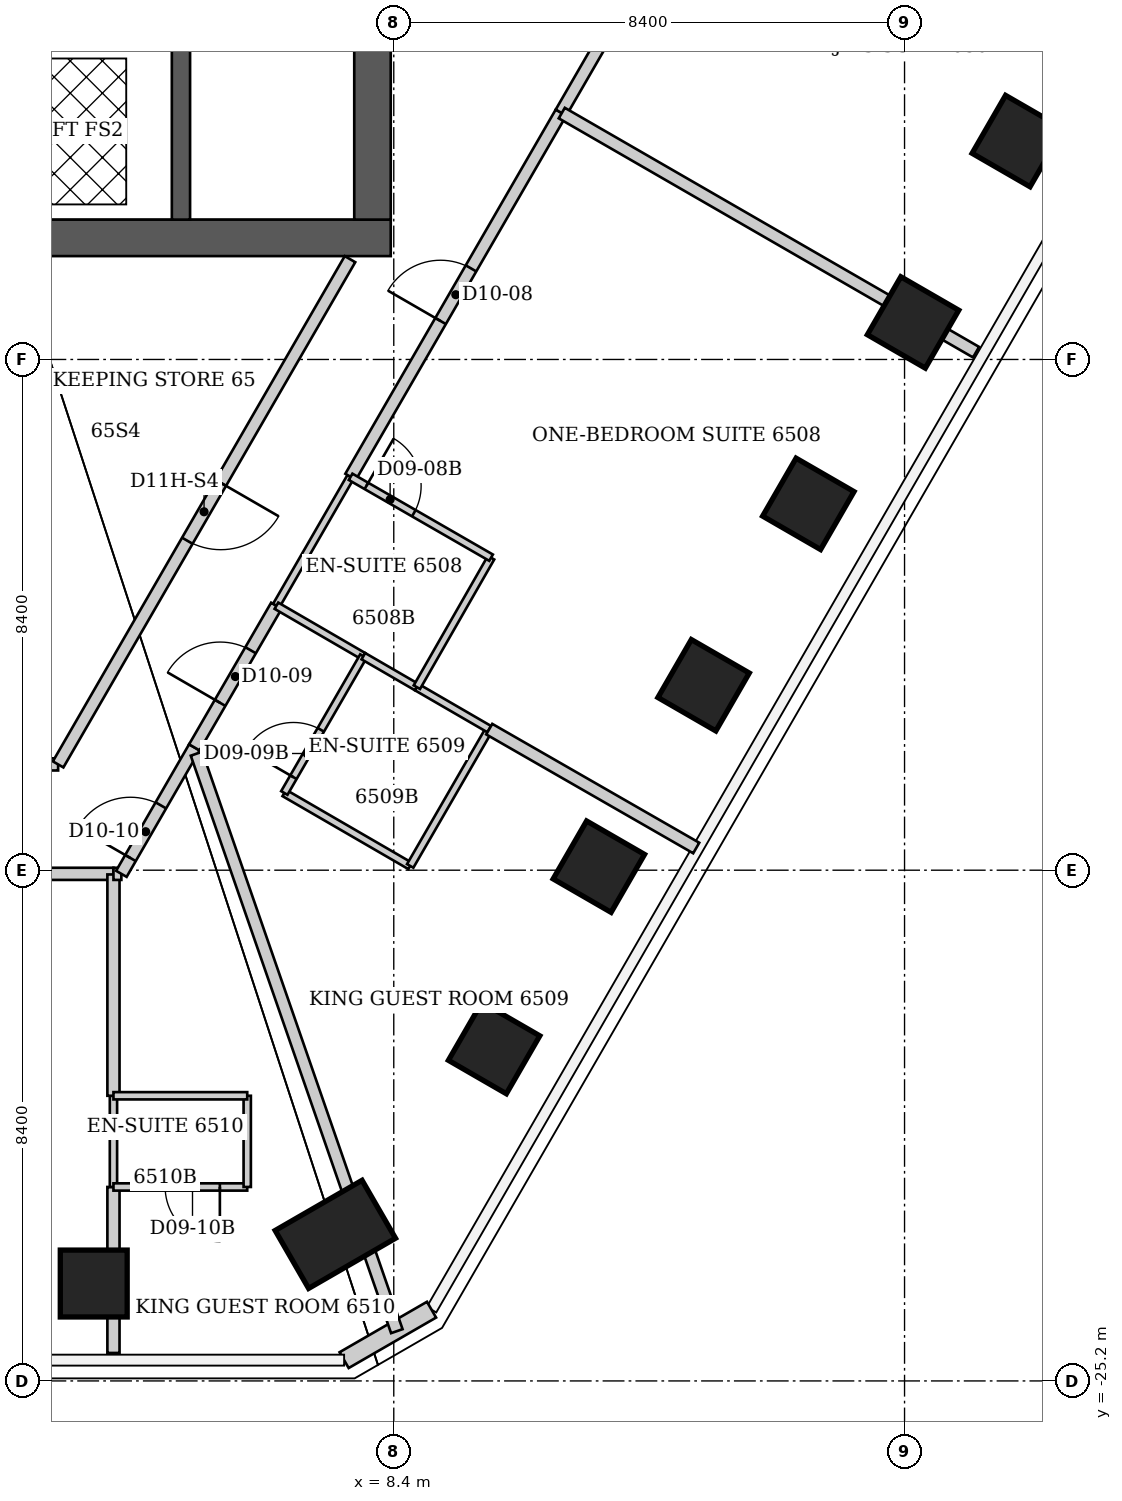
"""IFC4 building model, lengths in metres.
Left out: names, types, materials, properties, quantities, classifications, styles, units other than length and angle.
Written with IfcOpenShell. Run it as: python <this file> out.ifc"""

import sys

from ifc_helpers import new_model, si_unit, direction, frame, frame_2d, origin, origin_2d, place, context, subcontext, project, spatial, rectangle, extrude, element, fill, save


model = new_model("IFC4")
c1 = context("Model", 3, precision=1e-05, world=origin(), true_north=direction((0.0, 1.0)))
c2 = subcontext(c1, "Body", "Model", "MODEL_VIEW")
j1 = project(units=[si_unit("LENGTHUNIT", "METRE"), si_unit("PLANEANGLEUNIT", "RADIAN")], contexts=[c1])
p1 = place(None, origin())
s1 = spatial("IfcSite", under=j1, at=p1, CompositionType="ELEMENT")
p2 = place(p1, origin())
s2 = spatial("IfcBuilding", under=s1, at=p2, CompositionType="ELEMENT")
p3 = place(p2, frame((0.0, 0.0, 260.8)))
s3 = spatial("IfcBuildingStorey", under=s2, at=p3, CompositionType="ELEMENT", Elevation=260.8)
for number, where, z_axis, x_axis in (
    (1, (18.663, -4.808, 0.0), (0.0, 0.0, 1.0), (0.866, -0.5, 0.0)),
    (2, (16.94, -7.792, 0.0), (0.0, 0.0, 1.0), (0.866, -0.5, 0.0)),
    (3, (15.218, -10.775, 0.0), (0.0, 0.0, 1.0), (0.866, -0.5, 0.0)),
    (4, (13.495, -13.759, 0.0), (0.0, 0.0, 1.0), (0.866, -0.5, 0.0)),
    (5, (11.773, -16.742, 0.0), (0.0, 0.0, 1.0), (0.866, -0.5, 0.0)),
    (6, (10.05, -19.725, 0.0), (0.0, 0.0, 1.0), (0.866, -0.5, 0.0)),
):
    element("IfcColumn", number, at=place(p3, frame(where, z_axis=z_axis, x_axis=x_axis)), inside=s3, PredefinedType="COLUMN", context=c2, shape_type="SweptSolid", body=[
        extrude(rectangle(XDim=1.1, YDim=1.1, at=origin_2d()), origin(), (0.0, 0.0, 1.0), 3.8),
    ])
p4 = place(p3, frame((7.439, -22.79, 0.0), z_axis=(0.0, 0.0, 1.0), x_axis=(0.5, -0.866025403784, 0.0)))
e7 = element("IfcColumn", 7, at=p4, inside=s3, PredefinedType="COLUMN", context=c2, shape_type="SweptSolid", body=[
    extrude(rectangle(XDim=1.1, YDim=1.65, at=origin_2d()), origin(), (0.0, 0.0, 1.0), 3.8),
])
p5 = place(p3, frame((3.466, -23.598, 0.0), z_axis=(0.0, 0.0, 1.0), x_axis=(0.0, -1.0, 0.0)))
e8 = element("IfcColumn", 8, at=p5, inside=s3, PredefinedType="COLUMN", context=c2, shape_type="SweptSolid", body=[
    extrude(rectangle(XDim=1.1, YDim=1.1, at=origin_2d()), origin(), (0.0, 0.0, 1.0), 3.8),
])
p6 = place(p3, frame((-8.35, -6.4, 0.0), z_axis=(0.0, 0.0, 1.0), x_axis=(1.0, 0.0, 0.0)))
e9 = element("IfcWall", 9, at=p6, inside=s3, PredefinedType="SHEAR", context=c2, shape_type="SweptSolid", body=[
    extrude(rectangle(XDim=16.7, YDim=0.6, at=frame_2d((8.35, 0.0))), origin(), (0.0, 0.0, 1.0), 3.8),
])
p7 = place(p3, frame((8.05, -6.1, 0.0), z_axis=(0.0, 0.0, 1.0), x_axis=(0.0, 1.0, 0.0)))
e10 = element("IfcWall", 10, at=p7, inside=s3, PredefinedType="SHEAR", context=c2, shape_type="SweptSolid", body=[
    extrude(rectangle(XDim=12.2, YDim=0.6, at=frame_2d((6.1, 0.0))), origin(), (0.0, 0.0, 1.0), 3.8),
])
p8 = place(p7, frame((7.6, 0.0, 0.0)))
e11 = element("IfcOpeningElement", 11, at=p8, cuts=e10, PredefinedType="OPENING", context=c2, shape_type="SweptSolid", body=[
    extrude(rectangle(XDim=1.2, YDim=2.2, at=frame_2d((0.6, 1.1))), frame((0.0, 0.3, 0.0), z_axis=(0.0, -1.0, 0.0), x_axis=(1.0, 0.0, 0.0)), (0.0, 0.0, 1.0), 0.6),
])
p9 = place(p3, frame((4.9, -6.1, 0.0), z_axis=(0.0, 0.0, 1.0), x_axis=(0.0, 1.0, 0.0)))
e12 = element("IfcWall", 12, at=p9, inside=s3, PredefinedType="SHEAR", context=c2, shape_type="SweptSolid", body=[
    extrude(rectangle(XDim=7.2, YDim=0.3, at=frame_2d((3.6, 0.0))), origin(), (0.0, 0.0, 1.0), 3.8),
])
p10 = place(p3, frame((9.021, -24.028, 0.0), z_axis=(0.0, 0.0, 1.0), x_axis=(-0.865989634427, -0.500061949227, 0.0)))
e13 = element("IfcWall", 13, at=p10, inside=s3, PredefinedType="SOLIDWALL", context=c2, shape_type="SweptSolid", body=[
    extrude(rectangle(XDim=1.66, YDim=0.3, at=frame_2d((0.83, 0.0))), origin(), (0.0, 0.0, 1.0), 3.64),
])
p11 = place(p3, frame((-1.34, -16.86, 0.0), z_axis=(0.0, 0.0, 1.0), x_axis=(1.0, 0.0, 0.0)))
e14 = element("IfcWall", 14, at=p11, inside=s3, PredefinedType="PARTITIONING", context=c2, shape_type="SweptSolid", body=[
    extrude(rectangle(XDim=5.13, YDim=0.2, at=frame_2d((2.565, 0.0))), origin(), (0.0, 0.0, 1.0), 3.64),
])
p12 = place(p11, frame((2.065, 0.0, 0.0)))
e15 = element("IfcOpeningElement", 15, at=p12, cuts=e14, PredefinedType="OPENING", context=c2, shape_type="SweptSolid", body=[
    extrude(rectangle(XDim=1.0, YDim=2.13, at=frame_2d((0.5, 1.065))), frame((0.0, 0.1, 0.0), z_axis=(0.0, -1.0, 0.0), x_axis=(1.0, 0.0, 0.0)), (0.0, 0.0, 1.0), 0.2),
])
p13 = place(p3, frame((2.88, -15.06, 0.0), z_axis=(0.0, 0.0, 1.0), x_axis=(-1.0, 0.0, 0.0)))
e16 = element("IfcWall", 16, at=p13, inside=s3, PredefinedType="PARTITIONING", context=c2, shape_type="SweptSolid", body=[
    extrude(rectangle(XDim=1.28, YDim=0.2, at=frame_2d((0.64, 0.0))), origin(), (0.0, 0.0, 1.0), 3.64),
])
p14 = place(p3, frame((3.79, -24.74, 0.0), z_axis=(0.0, 0.0, 1.0), x_axis=(0.0, 1.0, 0.0)))
e17 = element("IfcWall", 17, at=p14, inside=s3, PredefinedType="PARTITIONING", context=c2, shape_type="SweptSolid", body=[
    extrude(rectangle(XDim=2.73, YDim=0.2, at=frame_2d((1.365, 0.0))), origin(), (0.0, 0.0, 1.0), 3.64),
])
p15 = place(p3, frame((3.79, -22.01, 0.0), z_axis=(0.0, 0.0, 1.0), x_axis=(0.0, 1.0, 0.0)))
e18 = element("IfcWall", 18, at=p15, inside=s3, PredefinedType="PARTITIONING", context=c2, shape_type="SweptSolid", body=[
    extrude(rectangle(XDim=1.5, YDim=0.12, at=frame_2d((0.75, 0.0))), origin(), (0.0, 0.0, 1.0), 3.64),
])
p16 = place(p3, frame((3.79, -22.01, 0.0), z_axis=(0.0, 0.0, 1.0), x_axis=(1.0, 0.0, 0.0)))
e19 = element("IfcWall", 19, at=p16, inside=s3, PredefinedType="PARTITIONING", context=c2, shape_type="SweptSolid", body=[
    extrude(rectangle(XDim=2.2, YDim=0.12, at=frame_2d((1.1, 0.0))), origin(), (0.0, 0.0, 1.0), 3.64),
])
p17 = place(p16, frame((0.85, 0.0, 0.0)))
e20 = element("IfcOpeningElement", 20, at=p17, cuts=e19, PredefinedType="OPENING", context=c2, shape_type="SweptSolid", body=[
    extrude(rectangle(XDim=0.9, YDim=2.03, at=frame_2d((0.45, 1.015))), frame((0.0, 0.06, 0.0), z_axis=(0.0, -1.0, 0.0), x_axis=(1.0, 0.0, 0.0)), (0.0, 0.0, 1.0), 0.12),
])
p18 = place(p3, frame((3.79, -20.51, 0.0), z_axis=(0.0, 0.0, 1.0), x_axis=(0.0, 1.0, 0.0)))
e21 = element("IfcWall", 21, at=p18, inside=s3, PredefinedType="PARTITIONING", context=c2, shape_type="SweptSolid", body=[
    extrude(rectangle(XDim=3.64, YDim=0.2, at=frame_2d((1.82, 0.0))), origin(), (0.0, 0.0, 1.0), 3.64),
])
p19 = place(p3, frame((3.79, -16.86, 0.0), z_axis=(0.0, 0.0, 1.0), x_axis=(1.0, 0.0, 0.0)))
e22 = element("IfcWall", 22, at=p19, inside=s3, PredefinedType="PARTITIONING", context=c2, shape_type="SweptSolid", body=[
    extrude(rectangle(XDim=0.13, YDim=0.2, at=frame_2d((0.065, 0.0))), origin(), (0.0, 0.0, 1.0), 3.64),
])
p20 = place(p3, frame((3.92, -16.86, 0.0), z_axis=(0.0, 0.0, 1.0), x_axis=(0.499693115345, 0.866202511239, 0.0)))
e23 = element("IfcWall", 23, at=p20, inside=s3, PredefinedType="PARTITIONING", context=c2, shape_type="SweptSolid", body=[
    extrude(rectangle(XDim=2.401, YDim=0.2, at=frame_2d((1.201, 0.0))), origin(), (0.0, 0.0, 1.0), 3.64),
])
p21 = place(p20, frame((0.3, 0.0, 0.0)))
e24 = element("IfcOpeningElement", 24, at=p21, cuts=e23, PredefinedType="OPENING", context=c2, shape_type="SweptSolid", body=[
    extrude(rectangle(XDim=1.0, YDim=2.13, at=frame_2d((0.5, 1.065))), frame((0.0, 0.1, 0.0), z_axis=(0.0, -1.0, 0.0), x_axis=(1.0, 0.0, 0.0)), (0.0, 0.0, 1.0), 0.2),
])
p22 = place(p3, frame((5.12, -14.78, 0.0), z_axis=(0.0, 0.0, 1.0), x_axis=(0.501343576294, 0.865248298761, 0.0)))
e25 = element("IfcWall", 25, at=p22, inside=s3, PredefinedType="PARTITIONING", context=c2, shape_type="SweptSolid", body=[
    extrude(rectangle(XDim=2.693, YDim=0.2, at=frame_2d((1.346, 0.0))), origin(), (0.0, 0.0, 1.0), 3.64),
])
p23 = place(p22, frame((0.846, 0.0, 0.0)))
e26 = element("IfcOpeningElement", 26, at=p23, cuts=e25, PredefinedType="OPENING", context=c2, shape_type="SweptSolid", body=[
    extrude(rectangle(XDim=1.0, YDim=2.13, at=frame_2d((0.5, 1.065))), frame((0.0, 0.1, 0.0), z_axis=(0.0, -1.0, 0.0), x_axis=(1.0, 0.0, 0.0)), (0.0, 0.0, 1.0), 0.2),
])
p24 = place(p3, frame((5.99, -22.01, 0.0), z_axis=(0.0, 0.0, 1.0), x_axis=(0.0, 1.0, 0.0)))
e27 = element("IfcWall", 27, at=p24, inside=s3, PredefinedType="PARTITIONING", context=c2, shape_type="SweptSolid", body=[
    extrude(rectangle(XDim=1.5, YDim=0.12, at=frame_2d((0.75, 0.0))), origin(), (0.0, 0.0, 1.0), 3.64),
])
p25 = place(p3, frame((5.99, -20.51, 0.0), z_axis=(0.0, 0.0, 1.0), x_axis=(-1.0, 0.0, 0.0)))
e28 = element("IfcWall", 28, at=p25, inside=s3, PredefinedType="PARTITIONING", context=c2, shape_type="SweptSolid", body=[
    extrude(rectangle(XDim=2.2, YDim=0.12, at=frame_2d((1.1, 0.0))), origin(), (0.0, 0.0, 1.0), 3.64),
])
p26 = place(p3, frame((6.467, -12.448, 0.0), z_axis=(0.0, 0.0, 1.0), x_axis=(0.499875104448, 0.866097500258, 0.0)))
e29 = element("IfcWall", 29, at=p26, inside=s3, PredefinedType="PARTITIONING", context=c2, shape_type="SweptSolid", body=[
    extrude(rectangle(XDim=2.446, YDim=0.12, at=frame_2d((1.223, 0.0))), origin(), (0.0, 0.0, 1.0), 3.64),
])
p27 = place(p3, frame((6.47, -12.45, 0.0), z_axis=(0.0, 0.0, 1.0), x_axis=(0.864842719649, -0.502042896843, 0.0)))
e30 = element("IfcWall", 30, at=p27, inside=s3, PredefinedType="PARTITIONING", context=c2, shape_type="SweptSolid", body=[
    extrude(rectangle(XDim=1.653, YDim=0.12, at=frame_2d((0.827, 0.0))), origin(), (0.0, 0.0, 1.0), 3.64),
])
p28 = place(p3, frame((6.6, -15.53, 0.0), z_axis=(0.0, 0.0, 1.0), x_axis=(0.865130376012, -0.501547039172, 0.0)))
e31 = element("IfcWall", 31, at=p28, inside=s3, PredefinedType="PARTITIONING", context=c2, shape_type="SweptSolid", body=[
    extrude(rectangle(XDim=2.393, YDim=0.12, at=frame_2d((1.196, 0.0))), origin(), (0.0, 0.0, 1.0), 3.64),
])
p29 = place(p3, frame((7.68, -6.75, 0.0), z_axis=(0.0, 0.0, 1.0), x_axis=(-0.500174600737, -0.865924574532, 0.0)))
e32 = element("IfcWall", 32, at=p29, inside=s3, PredefinedType="PARTITIONING", context=c2, shape_type="SweptSolid", body=[
    extrude(rectangle(XDim=9.597, YDim=0.2, at=frame_2d((4.798, 0.0))), origin(), (0.0, 0.0, 1.0), 3.64),
])
p30 = place(p29, frame((4.248, 0.0, 0.0)))
e33 = element("IfcOpeningElement", 33, at=p30, cuts=e32, PredefinedType="OPENING", context=c2, shape_type="SweptSolid", body=[
    extrude(rectangle(XDim=1.1, YDim=2.2, at=frame_2d((0.55, 1.1))), frame((0.0, 0.1, 0.0), z_axis=(0.0, -1.0, 0.0), x_axis=(1.0, 0.0, 0.0)), (0.0, 0.0, 1.0), 0.2),
])
p31 = place(p3, frame((7.69, -10.33, 0.0), z_axis=(0.0, 0.0, 1.0), x_axis=(0.500177633683, 0.865922822637, 0.0)))
e34 = element("IfcWall", 34, at=p31, inside=s3, PredefinedType="PARTITIONING", context=c2, shape_type="SweptSolid", body=[
    extrude(rectangle(XDim=6.917, YDim=0.2, at=frame_2d((3.459, 0.0))), origin(), (0.0, 0.0, 1.0), 3.64),
])
p32 = place(p31, frame((2.959, 0.0, 0.0)))
e35 = element("IfcOpeningElement", 35, at=p32, cuts=e34, PredefinedType="OPENING", context=c2, shape_type="SweptSolid", body=[
    extrude(rectangle(XDim=1.0, YDim=2.13, at=frame_2d((0.5, 1.065))), frame((0.0, 0.1, 0.0), z_axis=(0.0, -1.0, 0.0), x_axis=(1.0, 0.0, 0.0)), (0.0, 0.0, 1.0), 0.2),
])
p33 = place(p3, frame((7.9, -13.28, 0.0), z_axis=(0.0, 0.0, 1.0), x_axis=(-0.500221244143, -0.865897630733, 0.0)))
e36 = element("IfcWall", 36, at=p33, inside=s3, PredefinedType="PARTITIONING", context=c2, shape_type="SweptSolid", body=[
    extrude(rectangle(XDim=2.598, YDim=0.12, at=frame_2d((1.299, 0.0))), origin(), (0.0, 0.0, 1.0), 3.64),
])
p34 = place(p33, frame((1.399, 0.0, 0.0)))
e37 = element("IfcOpeningElement", 37, at=p34, cuts=e36, PredefinedType="OPENING", context=c2, shape_type="SweptSolid", body=[
    extrude(rectangle(XDim=0.9, YDim=2.03, at=frame_2d((0.45, 1.015))), frame((0.0, 0.06, 0.0), z_axis=(0.0, -1.0, 0.0), x_axis=(1.0, 0.0, 0.0)), (0.0, 0.0, 1.0), 0.12),
])
p35 = place(p3, frame((7.9, -13.28, 0.0), z_axis=(0.0, 0.0, 1.0), x_axis=(0.86522903342, -0.501376824082, 0.0)))
e38 = element("IfcWall", 38, at=p35, inside=s3, PredefinedType="PARTITIONING", context=c2, shape_type="SweptSolid", body=[
    extrude(rectangle(XDim=1.017, YDim=0.12, at=frame_2d((0.509, 0.0))), origin(), (0.0, 0.0, 1.0), 3.64),
])
p36 = place(p3, frame((8.45, -24.382, 0.0), z_axis=(0.0, 0.0, 1.0), x_axis=(-0.327686879249, 0.944786382823, 0.0)))
e39 = element("IfcWall", 39, at=p36, inside=s3, PredefinedType="PARTITIONING", context=c2, shape_type="SweptSolid", body=[
    extrude(rectangle(XDim=10.053, YDim=0.2, at=frame_2d((5.026, 0.0))), origin(), (0.0, 0.0, 1.0), 3.64),
])
p37 = place(p3, frame((8.67, -16.73, 0.0), z_axis=(0.0, 0.0, 1.0), x_axis=(0.500291685314, 0.865856933682, 0.0)))
e40 = element("IfcWall", 40, at=p37, inside=s3, PredefinedType="PARTITIONING", context=c2, shape_type="SweptSolid", body=[
    extrude(rectangle(XDim=2.599, YDim=0.12, at=frame_2d((1.299, 0.0))), origin(), (0.0, 0.0, 1.0), 3.64),
])
p38 = place(p3, frame((8.78, -13.79, 0.0), z_axis=(0.0, 0.0, 1.0), x_axis=(0.865102050426, -0.501595895466, 0.0)))
e41 = element("IfcWall", 41, at=p38, inside=s3, PredefinedType="PARTITIONING", context=c2, shape_type="SweptSolid", body=[
    extrude(rectangle(XDim=1.375, YDim=0.12, at=frame_2d((0.688, 0.0))), origin(), (0.0, 0.0, 1.0), 3.64),
])
p39 = place(p3, frame((8.78, -13.79, 0.0), z_axis=(0.0, 0.0, 1.0), x_axis=(0.497027744361, 0.86773464915, 0.0)))
e42 = element("IfcWall", 42, at=p39, inside=s3, PredefinedType="PARTITIONING", context=c2, shape_type="SweptSolid", body=[
    extrude(rectangle(XDim=2.455, YDim=0.12, at=frame_2d((1.227, 0.0))), origin(), (0.0, 0.0, 1.0), 3.64),
])
p40 = place(p3, frame((9.97, -14.48, 0.0), z_axis=(0.0, 0.0, 1.0), x_axis=(0.867154119852, -0.498039890395, 0.0)))
e43 = element("IfcWall", 43, at=p40, inside=s3, PredefinedType="PARTITIONING", context=c2, shape_type="SweptSolid", body=[
    extrude(rectangle(XDim=3.926, YDim=0.2, at=frame_2d((1.963, 0.0))), origin(), (0.0, 0.0, 1.0), 3.64),
])
p41 = place(p3, frame((10.0, -11.66, 0.0), z_axis=(0.0, 0.0, 1.0), x_axis=(-0.866654860089, 0.498908161372, 0.0)))
e44 = element("IfcWall", 44, at=p41, inside=s3, PredefinedType="PARTITIONING", context=c2, shape_type="SweptSolid", body=[
    extrude(rectangle(XDim=2.666, YDim=0.12, at=frame_2d((1.333, 0.0))), origin(), (0.0, 0.0, 1.0), 3.023),
])
p42 = place(p41, frame((1.466, 0.0, 0.0)))
e45 = element("IfcOpeningElement", 45, at=p42, cuts=e44, PredefinedType="OPENING", context=c2, shape_type="SweptSolid", body=[
    extrude(rectangle(XDim=0.9, YDim=2.03, at=frame_2d((0.45, 1.015))), frame((0.0, 0.06, 0.0), z_axis=(0.0, -1.0, 0.0), x_axis=(1.0, 0.0, 0.0)), (0.0, 0.0, 1.0), 0.12),
])
p43 = place(p3, frame((11.15, -4.34, 0.0), z_axis=(0.0, 0.0, 1.0), x_axis=(0.500113178326, 0.865960050386, 0.0)))
e46 = element("IfcWall", 46, at=p43, inside=s3, PredefinedType="PARTITIONING", context=c2, shape_type="SweptSolid", body=[
    extrude(rectangle(XDim=6.779, YDim=0.2, at=frame_2d((3.389, 0.0))), origin(), (0.0, 0.0, 1.0), 3.64),
])
p44 = place(p43, frame((2.889, 0.0, 0.0)))
e47 = element("IfcOpeningElement", 47, at=p44, cuts=e46, PredefinedType="OPENING", context=c2, shape_type="SweptSolid", body=[
    extrude(rectangle(XDim=1.0, YDim=2.13, at=frame_2d((0.5, 1.065))), frame((0.0, 0.1, 0.0), z_axis=(0.0, -1.0, 0.0), x_axis=(1.0, 0.0, 0.0)), (0.0, 0.0, 1.0), 0.2),
])
p45 = place(p3, frame((17.976, -8.28, 0.0), z_axis=(0.0, 0.0, 1.0), x_axis=(-0.866080683341, 0.499904240773, 0.0)))
e48 = element("IfcWall", 48, at=p45, inside=s3, PredefinedType="PARTITIONING", context=c2, shape_type="SweptSolid", body=[
    extrude(rectangle(XDim=7.867, YDim=0.2, at=frame_2d((3.933, 0.0))), origin(), (0.0, 0.0, 1.0), 3.64),
])
p46 = place(p32, origin())
e49 = element("IfcDoor", 49, at=p46, inside=s3, OperationType="SINGLE_SWING_LEFT", PredefinedType="DOOR", context=c2, shape_type="SweptSolid", body=[
    extrude(rectangle(XDim=1.0, YDim=2.13, at=frame_2d((0.5, 1.065))), frame((0.0, 0.025, 0.0), z_axis=(0.0, -1.0, 0.0), x_axis=(1.0, 0.0, 0.0)), (0.0, 0.0, 1.0), 0.05),
])
fill(e35, e49)
p47 = place(p42, origin())
e50 = element("IfcDoor", 50, at=p47, inside=s3, OperationType="SINGLE_SWING_RIGHT", PredefinedType="DOOR", context=c2, shape_type="SweptSolid", body=[
    extrude(rectangle(XDim=0.9, YDim=2.03, at=frame_2d((0.45, 1.015))), frame((0.0, 0.025, 0.0), z_axis=(0.0, -1.0, 0.0), x_axis=(1.0, 0.0, 0.0)), (0.0, 0.0, 1.0), 0.05),
])
fill(e45, e50)
p48 = place(p23, origin())
e51 = element("IfcDoor", 51, at=p48, inside=s3, OperationType="SINGLE_SWING_LEFT", PredefinedType="DOOR", context=c2, shape_type="SweptSolid", body=[
    extrude(rectangle(XDim=1.0, YDim=2.13, at=frame_2d((0.5, 1.065))), frame((0.0, 0.025, 0.0), z_axis=(0.0, -1.0, 0.0), x_axis=(1.0, 0.0, 0.0)), (0.0, 0.0, 1.0), 0.05),
])
fill(e26, e51)
p49 = place(p34, origin())
e52 = element("IfcDoor", 52, at=p49, inside=s3, OperationType="SINGLE_SWING_RIGHT", PredefinedType="DOOR", context=c2, shape_type="SweptSolid", body=[
    extrude(rectangle(XDim=0.9, YDim=2.03, at=frame_2d((0.45, 1.015))), frame((0.0, 0.025, 0.0), z_axis=(0.0, -1.0, 0.0), x_axis=(1.0, 0.0, 0.0)), (0.0, 0.0, 1.0), 0.05),
])
fill(e37, e52)
p50 = place(p21, origin())
e53 = element("IfcDoor", 53, at=p50, inside=s3, OperationType="SINGLE_SWING_LEFT", PredefinedType="DOOR", context=c2, shape_type="SweptSolid", body=[
    extrude(rectangle(XDim=1.0, YDim=2.13, at=frame_2d((0.5, 1.065))), frame((0.0, 0.025, 0.0), z_axis=(0.0, -1.0, 0.0), x_axis=(1.0, 0.0, 0.0)), (0.0, 0.0, 1.0), 0.05),
])
fill(e24, e53)
p51 = place(p17, origin())
e54 = element("IfcDoor", 54, at=p51, inside=s3, OperationType="SINGLE_SWING_RIGHT", PredefinedType="DOOR", context=c2, shape_type="SweptSolid", body=[
    extrude(rectangle(XDim=0.9, YDim=2.03, at=frame_2d((0.45, 1.015))), frame((0.0, 0.025, 0.0), z_axis=(0.0, -1.0, 0.0), x_axis=(1.0, 0.0, 0.0)), (0.0, 0.0, 1.0), 0.05),
])
fill(e20, e54)
p52 = place(p30, origin())
e55 = element("IfcDoor", 55, at=p52, inside=s3, OperationType="SINGLE_SWING_LEFT", PredefinedType="DOOR", context=c2, shape_type="SweptSolid", body=[
    extrude(rectangle(XDim=1.1, YDim=2.2, at=frame_2d((0.55, 1.1))), frame((0.0, 0.025, 0.0), z_axis=(0.0, -1.0, 0.0), x_axis=(1.0, 0.0, 0.0)), (0.0, 0.0, 1.0), 0.05),
])
fill(e33, e55)
save(model, sys.argv[1])
